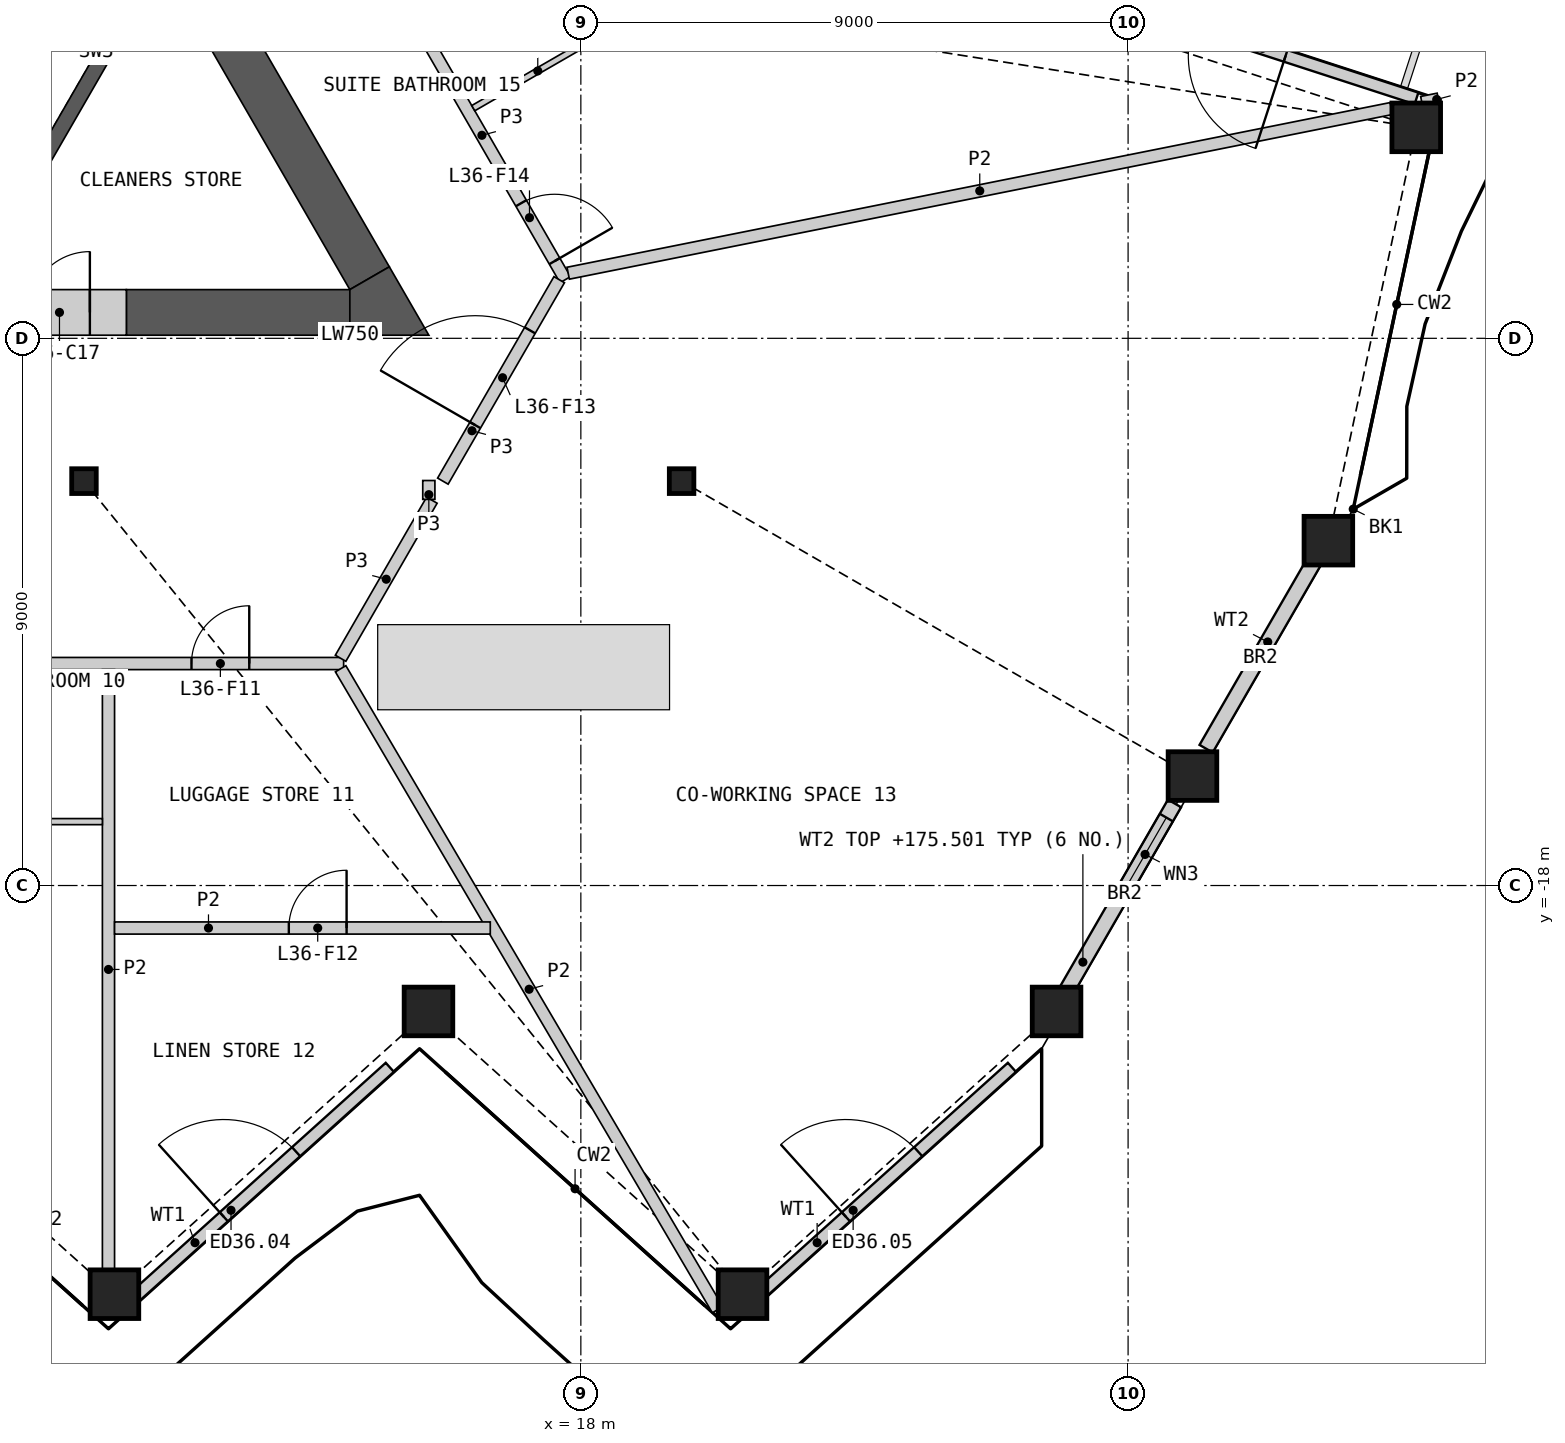
"""IFC4 building model, lengths in metres.
Left out: names, types, materials, properties, quantities, classifications, styles, units other than length and angle.
Written with IfcOpenShell. Run it as: python <this file> out.ifc"""

import sys

from ifc_helpers import new_model, si_unit, direction, frame, frame_2d, origin, origin_2d, place, context, subcontext, project, spatial, polyline, rectangle, hollow_rectangle, i_section, outline, extrude, element, fill, save


model = new_model("IFC4")
c1 = context("Model", 3, precision=1e-05, world=origin(), true_north=direction((0.0, 1.0)))
c2 = subcontext(c1, "Body", "Model", "MODEL_VIEW")
j1 = project(units=[si_unit("LENGTHUNIT", "METRE"), si_unit("PLANEANGLEUNIT", "RADIAN")], contexts=[c1])
p1 = place(None, origin())
s1 = spatial("IfcSite", under=j1, at=p1, CompositionType="ELEMENT")
p2 = place(p1, origin())
s2 = spatial("IfcBuilding", under=s1, at=p2, CompositionType="ELEMENT")
p3 = place(p2, frame((0.0, 0.0, 172.8)))
s3 = spatial("IfcBuildingStorey", under=s2, at=p3, CompositionType="ELEMENT", Elevation=172.8)
for number, where, z_axis, x_axis in (
    (1, (10.329, -24.722, 0.0), (0.0, 0.0, 1.0), (1.0, 0.0, 0.0)),
    (2, (15.494, -20.071, 0.0), (0.0, 0.0, 1.0), (1.0, 0.0, 0.0)),
    (3, (20.659, -24.722, 0.0), (0.0, 0.0, 1.0), (1.0, 0.0, 0.0)),
    (4, (25.823, -20.071, 0.0), (0.0, 0.0, 1.0), (1.0, 0.0, 0.0)),
    (5, (28.059, -16.2, 0.0), (0.0, 0.0, 1.0), (1.0, 0.0, 0.0)),
    (6, (30.294, -12.328, 0.0), (0.0, 0.0, 1.0), (1.0, 0.0, 0.0)),
    (7, (31.739, -5.53, 0.0), (0.0, 0.0, 1.0), (1.0, 0.0, 0.0)),
):
    element("IfcColumn", number, at=place(p3, frame(where, z_axis=z_axis, x_axis=x_axis)), inside=s3, PredefinedType="COLUMN", context=c2, shape_type="SweptSolid", body=[
        extrude(hollow_rectangle(XDim=0.8, YDim=0.8, WallThickness=0.05, at=origin_2d()), origin(), (0.0, 0.0, 1.0), 3.6),
    ])
for number, where, z_axis, x_axis in (
    (8, (9.828, -11.349, 0.0), (0.0, 0.0, 1.0), (1.0, 0.0, 0.0)),
    (9, (19.657, -11.349, 0.0), (0.0, 0.0, 1.0), (1.0, 0.0, 0.0)),
):
    element("IfcColumn", number, at=place(p3, frame(where, z_axis=z_axis, x_axis=x_axis)), inside=s3, PredefinedType="COLUMN", context=c2, shape_type="SweptSolid", body=[
        extrude(i_section(OverallWidth=0.404, OverallDepth=0.407, WebThickness=0.027, FlangeThickness=0.044, at=origin_2d()), origin(), (0.0, 0.0, 1.0), 3.6),
    ])
p4 = place(p3, frame((10.587, -24.836, 0.0), z_axis=(0.0, 0.0, 1.0), x_axis=(0.74315473474, 0.669119600844, 0.0)))
e10 = element("IfcWall", 10, at=p4, inside=s3, PredefinedType="SOLIDWALL", context=c2, shape_type="SweptSolid", body=[
    extrude(rectangle(XDim=5.748, YDim=0.2, at=frame_2d((2.874, 0.0))), origin(), (0.0, 0.0, 1.0), 2.701),
])
p5 = place(p4, frame((2.074, 0.0, 0.0)))
e11 = element("IfcOpeningElement", 11, at=p5, cuts=e10, PredefinedType="OPENING", context=c2, shape_type="SweptSolid", body=[
    extrude(rectangle(XDim=1.6, YDim=2.4, at=frame_2d((0.8, 1.2))), frame((0.0, 0.11, 0.0), z_axis=(0.0, -1.0, 0.0), x_axis=(1.0, 0.0, 0.0)), (0.0, 0.0, 1.0), 0.22),
])
p6 = place(p3, frame((20.818, -24.836, 0.0), z_axis=(0.0, 0.0, 1.0), x_axis=(0.74315473474, 0.669119600844, 0.0)))
e12 = element("IfcWall", 12, at=p6, inside=s3, PredefinedType="SOLIDWALL", context=c2, shape_type="SweptSolid", body=[
    extrude(rectangle(XDim=5.748, YDim=0.2, at=frame_2d((2.874, 0.0))), origin(), (0.0, 0.0, 1.0), 2.701),
])
p7 = place(p6, frame((2.074, 0.0, 0.0)))
e13 = element("IfcOpeningElement", 13, at=p7, cuts=e12, PredefinedType="OPENING", context=c2, shape_type="SweptSolid", body=[
    extrude(rectangle(XDim=1.6, YDim=2.4, at=frame_2d((0.8, 1.2))), frame((0.0, 0.11, 0.0), z_axis=(0.0, -1.0, 0.0), x_axis=(1.0, 0.0, 0.0)), (0.0, 0.0, 1.0), 0.22),
])
p8 = place(p3, frame((25.754, -20.13, 0.0), z_axis=(0.0, 0.0, 1.0), x_axis=(0.500039726511, 0.866002466458, 0.0)))
e14 = element("IfcWall", 14, at=p8, inside=s3, PredefinedType="SOLIDWALL", context=c2, shape_type="SweptSolid", body=[
    extrude(rectangle(XDim=4.019, YDim=0.25, at=frame_2d((2.009, 0.0))), origin(), (0.0, 0.0, 1.0), 2.701),
])
p9 = place(p8, frame((2.35, 0.0, 1.7)))
e15 = element("IfcOpeningElement", 15, at=p9, cuts=e14, PredefinedType="OPENING", context=c2, shape_type="SweptSolid", body=[
    extrude(rectangle(XDim=1.4, YDim=0.8, at=frame_2d((0.7, 0.4))), frame((0.0, 0.135, 0.0), z_axis=(0.0, -1.0, 0.0), x_axis=(1.0, 0.0, 0.0)), (0.0, 0.0, 1.0), 0.27),
])
p10 = place(p3, frame((28.283, -15.75, 0.0), z_axis=(0.0, 0.0, 1.0), x_axis=(0.500005680777, 0.866022123962, 0.0)))
e16 = element("IfcWall", 16, at=p10, inside=s3, PredefinedType="SOLIDWALL", context=c2, shape_type="SweptSolid", body=[
    extrude(rectangle(XDim=4.054, YDim=0.25, at=frame_2d((2.027, 0.0))), origin(), (0.0, 0.0, 1.0), 2.701),
])
p11 = place(p3, frame((31.743, -5.054, 0.0), z_axis=(0.0, 0.0, 1.0), x_axis=(-0.951061260164, 0.309002393867, 0.0)))
e17 = element("IfcWall", 17, at=p11, inside=s3, PredefinedType="SOLIDWALL", context=c2, shape_type="SweptSolid", body=[
    extrude(rectangle(XDim=5.938, YDim=0.2, at=frame_2d((2.969, 0.0))), origin(), (0.0, 0.0, 1.0), 2.701),
])
p12 = place(p11, frame((2.264, 0.0, 0.0)))
e18 = element("IfcOpeningElement", 18, at=p12, cuts=e17, PredefinedType="OPENING", context=c2, shape_type="SweptSolid", body=[
    extrude(rectangle(XDim=1.6, YDim=2.4, at=frame_2d((0.8, 1.2))), frame((0.0, 0.11, 0.0), z_axis=(0.0, -1.0, 0.0), x_axis=(1.0, 0.0, 0.0)), (0.0, 0.0, 1.0), 0.22),
])
p13 = place(p3, origin())
e19 = element("IfcWall", 19, at=p13, inside=s3, PredefinedType="SHEAR", context=c2, shape_type="SweptSolid", body=[
    extrude(outline(polyline([(8.83, -6.881), (10.374, -4.206), (10.032, -4.298), (8.738, -6.539), (8.83, -6.881)])), origin(), (0.0, 0.0, 1.0), 3.25),
])
p14 = place(p3, origin())
e20 = element("IfcWall", 20, at=p14, inside=s3, PredefinedType="SHEAR", context=c2, shape_type="SweptSolid", body=[
    extrude(outline(polyline([(10.032, -4.298), (10.374, -4.206), (5.307, -1.281), (5.182, -1.498), (10.032, -4.298)])), origin(), (0.0, 0.0, 1.0), 3.25),
])
p15 = place(p3, frame((10.525, -8.574, 0.0), z_axis=(0.0, 0.0, 1.0), x_axis=(1.0, 0.0, 0.0)))
e21 = element("IfcWall", 21, at=p15, inside=s3, PredefinedType="SHEAR", context=c2, shape_type="SweptSolid", body=[
    extrude(rectangle(XDim=3.676, YDim=0.75, at=frame_2d((1.838, 0.0))), origin(), (0.0, 0.0, 1.0), 3.25),
])
p16 = place(p3, frame((14.526, -8.011, 0.0), z_axis=(0.0, 0.0, 1.0), x_axis=(-0.499994855372, 0.866028374016, 0.0)))
e22 = element("IfcWall", 22, at=p16, inside=s3, PredefinedType="SHEAR", context=c2, shape_type="SweptSolid", body=[
    extrude(rectangle(XDim=14.301, YDim=0.75, at=frame_2d((7.15, 0.0))), origin(), (0.0, 0.0, 1.0), 3.25),
])
p17 = place(p3, origin())
e23 = element("IfcWall", 23, at=p17, inside=s3, PredefinedType="SHEAR", context=c2, shape_type="SweptSolid", body=[
    extrude(outline(polyline([(14.201, -8.949), (14.201, -8.199), (14.851, -7.824), (15.5, -8.949), (14.201, -8.949)])), origin(), (0.0, 0.0, 1.0), 3.25),
])
p18 = place(p3, frame((8.325, -8.574, 0.0), z_axis=(0.0, 0.0, 1.0), x_axis=(1.0, 0.0, 0.0)))
e24 = element("IfcWall", 24, at=p18, inside=s3, PredefinedType="SHEAR", context=c2, shape_type="SweptSolid", body=[
    extrude(rectangle(XDim=2.2, YDim=0.75, at=frame_2d((1.1, 0.0))), origin(), (0.0, 0.0, 1.0), 3.25),
])
p19 = place(p18, frame((0.6, 0.0, 0.0)))
e25 = element("IfcOpeningElement", 25, at=p19, cuts=e24, PredefinedType="OPENING", context=c2, shape_type="SweptSolid", body=[
    extrude(rectangle(XDim=1.0, YDim=2.1, at=frame_2d((0.5, 1.05))), frame((0.0, 0.385, 0.0), z_axis=(0.0, -1.0, 0.0), x_axis=(1.0, 0.0, 0.0)), (0.0, 0.0, 1.0), 0.77),
])
p20 = place(p3, frame((-14.099, -14.349, 0.0), z_axis=(0.0, 0.0, 1.0), x_axis=(1.0, 0.0, 0.0)))
e26 = element("IfcWall", 26, at=p20, inside=s3, PredefinedType="PARTITIONING", context=c2, shape_type="SweptSolid", body=[
    extrude(rectangle(XDim=28.198, YDim=0.2, at=frame_2d((14.099, 0.0))), origin(), (0.0, 0.0, 1.0), 3.25),
])
p21 = place(p20, frame((1.552, 0.0, 0.0)))
e27 = element("IfcOpeningElement", 27, at=p21, cuts=e26, PredefinedType="OPENING", context=c2, shape_type="SweptSolid", body=[
    extrude(rectangle(XDim=0.95, YDim=2.1, at=frame_2d((0.475, 1.05))), frame((0.0, 0.11, 0.0), z_axis=(0.0, -1.0, 0.0), x_axis=(1.0, 0.0, 0.0)), (0.0, 0.0, 1.0), 0.22),
])
p22 = place(p20, frame((7.677, 0.0, 0.0)))
e28 = element("IfcOpeningElement", 28, at=p22, cuts=e26, PredefinedType="OPENING", context=c2, shape_type="SweptSolid", body=[
    extrude(rectangle(XDim=1.0, YDim=2.1, at=frame_2d((0.5, 1.05))), frame((0.0, 0.11, 0.0), z_axis=(0.0, -1.0, 0.0), x_axis=(1.0, 0.0, 0.0)), (0.0, 0.0, 1.0), 0.22),
])
p23 = place(p20, frame((9.283, 0.0, 0.0)))
e29 = element("IfcOpeningElement", 29, at=p23, cuts=e26, PredefinedType="OPENING", context=c2, shape_type="SweptSolid", body=[
    extrude(rectangle(XDim=1.0, YDim=2.1, at=frame_2d((0.5, 1.05))), frame((0.0, 0.11, 0.0), z_axis=(0.0, -1.0, 0.0), x_axis=(1.0, 0.0, 0.0)), (0.0, 0.0, 1.0), 0.22),
])
p24 = place(p20, frame((17.915, 0.0, 0.0)))
e30 = element("IfcOpeningElement", 30, at=p24, cuts=e26, PredefinedType="OPENING", context=c2, shape_type="SweptSolid", body=[
    extrude(rectangle(XDim=1.0, YDim=2.1, at=frame_2d((0.5, 1.05))), frame((0.0, 0.11, 0.0), z_axis=(0.0, -1.0, 0.0), x_axis=(1.0, 0.0, 0.0)), (0.0, 0.0, 1.0), 0.22),
])
p25 = place(p20, frame((19.521, 0.0, 0.0)))
e31 = element("IfcOpeningElement", 31, at=p25, cuts=e26, PredefinedType="OPENING", context=c2, shape_type="SweptSolid", body=[
    extrude(rectangle(XDim=1.0, YDim=2.1, at=frame_2d((0.5, 1.05))), frame((0.0, 0.11, 0.0), z_axis=(0.0, -1.0, 0.0), x_axis=(1.0, 0.0, 0.0)), (0.0, 0.0, 1.0), 0.22),
])
p26 = place(p20, frame((25.696, 0.0, 0.0)))
e32 = element("IfcOpeningElement", 32, at=p26, cuts=e26, PredefinedType="OPENING", context=c2, shape_type="SweptSolid", body=[
    extrude(rectangle(XDim=0.95, YDim=2.1, at=frame_2d((0.475, 1.05))), frame((0.0, 0.11, 0.0), z_axis=(0.0, -1.0, 0.0), x_axis=(1.0, 0.0, 0.0)), (0.0, 0.0, 1.0), 0.22),
])
p27 = place(p3, frame((15.002, -3.286, 0.0), z_axis=(0.0, 0.0, 1.0), x_axis=(0.500007607708, -0.866021011428, 0.0)))
e33 = element("IfcWall", 33, at=p27, inside=s3, PredefinedType="PARTITIONING", context=c2, shape_type="SweptSolid", body=[
    extrude(rectangle(XDim=5.484, YDim=0.2, at=frame_2d((2.742, 0.0))), origin(), (0.0, 0.0, 1.0), 3.25),
])
p28 = place(p27, frame((4.032, 0.0, 0.0)))
e34 = element("IfcOpeningElement", 34, at=p28, cuts=e33, PredefinedType="OPENING", context=c2, shape_type="SweptSolid", body=[
    extrude(rectangle(XDim=1.1, YDim=2.1, at=frame_2d((0.55, 1.05))), frame((0.0, 0.11, 0.0), z_axis=(0.0, -1.0, 0.0), x_axis=(1.0, 0.0, 0.0)), (0.0, 0.0, 1.0), 0.22),
])
p29 = place(p3, frame((15.731, -11.349, 0.0), z_axis=(0.0, 0.0, 1.0), x_axis=(0.499961815444, 0.866047448526, 0.0)))
e35 = element("IfcWall", 35, at=p29, inside=s3, PredefinedType="PARTITIONING", context=c2, shape_type="SweptSolid", body=[
    extrude(rectangle(XDim=3.826, YDim=0.2, at=frame_2d((1.913, 0.0))), origin(), (0.0, 0.0, 1.0), 3.25),
])
p30 = place(p29, frame((1.064, 0.0, 0.0)))
e36 = element("IfcOpeningElement", 36, at=p30, cuts=e35, PredefinedType="OPENING", context=c2, shape_type="SweptSolid", body=[
    extrude(rectangle(XDim=1.8, YDim=2.1, at=frame_2d((0.9, 1.05))), frame((0.0, 0.11, 0.0), z_axis=(0.0, -1.0, 0.0), x_axis=(1.0, 0.0, 0.0)), (0.0, 0.0, 1.0), 0.22),
])
p31 = place(p3, frame((14.049, -14.262, 0.0), z_axis=(0.0, 0.0, 1.0), x_axis=(0.500048608389, 0.865997337899, 0.0)))
e37 = element("IfcWall", 37, at=p31, inside=s3, PredefinedType="PARTITIONING", context=c2, shape_type="SweptSolid", body=[
    extrude(rectangle(XDim=3.002, YDim=0.2, at=frame_2d((1.501, 0.0))), origin(), (0.0, 0.0, 1.0), 3.25),
])
p32 = place(p3, frame((15.5, -11.649, 0.0), z_axis=(0.0, 0.0, 1.0), x_axis=(0.0, 1.0, 0.0)))
e38 = element("IfcWall", 38, at=p32, inside=s3, PredefinedType="PARTITIONING", context=c2, shape_type="SweptSolid", body=[
    extrude(rectangle(XDim=0.31, YDim=0.2, at=frame_2d((0.155, 0.0))), origin(), (0.0, 0.0, 1.0), 3.25),
])
p33 = place(p3, frame((17.792, -7.929, 0.0), z_axis=(0.0, 0.0, 1.0), x_axis=(0.980565709097, 0.196190953266, 0.0)))
e39 = element("IfcWall", 39, at=p33, inside=s3, PredefinedType="PARTITIONING", context=c2, shape_type="SweptSolid", body=[
    extrude(rectangle(XDim=13.805, YDim=0.2, at=frame_2d((6.903, 0.0))), origin(), (0.0, 0.0, 1.0), 2.404),
])
p34 = place(p3, frame((14.05, -14.435, 0.0), z_axis=(0.0, 0.0, 1.0), x_axis=(0.50691019554, -0.861998871031, 0.0)))
e40 = element("IfcWall", 40, at=p34, inside=s3, PredefinedType="PARTITIONING", context=c2, shape_type="SweptSolid", body=[
    extrude(rectangle(XDim=12.229, YDim=0.2, at=frame_2d((6.115, 0.0))), origin(), (0.0, 0.0, 1.0), 2.404),
])
p35 = place(p3, frame((10.231, -24.312, 0.0), z_axis=(0.0, 0.0, 1.0), x_axis=(0.0, 1.0, 0.0)))
e41 = element("IfcWall", 41, at=p35, inside=s3, PredefinedType="PARTITIONING", context=c2, shape_type="SweptSolid", body=[
    extrude(rectangle(XDim=9.863, YDim=0.2, at=frame_2d((4.931, 0.0))), origin(), (0.0, 0.0, 1.0), 2.404),
])
p36 = place(p3, frame((10.331, -18.699, 0.0), z_axis=(0.0, 0.0, 1.0), x_axis=(1.0, 0.0, 0.0)))
e42 = element("IfcWall", 42, at=p36, inside=s3, PredefinedType="PARTITIONING", context=c2, shape_type="SweptSolid", body=[
    extrude(rectangle(XDim=6.179, YDim=0.2, at=frame_2d((3.09, 0.0))), origin(), (0.0, 0.0, 1.0), 2.404),
])
p37 = place(p36, frame((2.866, 0.0, 0.0)))
e43 = element("IfcOpeningElement", 43, at=p37, cuts=e42, PredefinedType="OPENING", context=c2, shape_type="SweptSolid", body=[
    extrude(rectangle(XDim=0.95, YDim=2.1, at=frame_2d((0.475, 1.05))), frame((0.0, 0.11, 0.0), z_axis=(0.0, -1.0, 0.0), x_axis=(1.0, 0.0, 0.0)), (0.0, 0.0, 1.0), 0.22),
])
p38 = place(p3, frame((31.831, -5.12, 0.0), z_axis=(0.0, 0.0, 1.0), x_axis=(0.980512850695, 0.19645495571, 0.0)))
e44 = element("IfcWall", 44, at=p38, inside=s3, PredefinedType="PARTITIONING", context=c2, shape_type="SweptSolid", body=[
    extrude(rectangle(XDim=0.277, YDim=0.2, at=frame_2d((0.139, 0.0))), origin(), (0.0, 0.0, 1.0), 2.404),
])
p39 = place(p3, frame((7.481, -16.949, 0.0), z_axis=(0.0, 0.0, 1.0), x_axis=(1.0, 0.0, 0.0)))
e45 = element("IfcWall", 45, at=p39, inside=s3, PredefinedType="PARTITIONING", context=c2, shape_type="SweptSolid", body=[
    extrude(rectangle(XDim=2.65, YDim=0.1, at=frame_2d((1.325, 0.0))), origin(), (0.0, 0.0, 1.0), 2.404),
])
p40 = place(p39, frame((0.25, 0.0, 0.0)))
e46 = element("IfcOpeningElement", 46, at=p40, cuts=e45, PredefinedType="OPENING", context=c2, shape_type="SweptSolid", body=[
    extrude(rectangle(XDim=0.95, YDim=2.1, at=frame_2d((0.475, 1.05))), frame((0.0, 0.06, 0.0), z_axis=(0.0, -1.0, 0.0), x_axis=(1.0, 0.0, 0.0)), (0.0, 0.0, 1.0), 0.12),
])
p41 = place(p3, frame((16.231, -5.215, 0.0), z_axis=(0.0, 0.0, 1.0), x_axis=(0.866057815567, 0.499943856944, 0.0)))
e47 = element("IfcWall", 47, at=p41, inside=s3, PredefinedType="PARTITIONING", context=c2, shape_type="SweptSolid", body=[
    extrude(rectangle(XDim=2.45, YDim=0.1, at=frame_2d((1.225, 0.0))), origin(), (0.0, 0.0, 1.0), 2.404),
])
p42 = place(p5, origin())
e48 = element("IfcDoor", 48, at=p42, inside=s3, OperationType="DOUBLE_DOOR_SINGLE_SWING", PredefinedType="DOOR", context=c2, shape_type="SweptSolid", body=[
    extrude(rectangle(XDim=1.6, YDim=2.4, at=frame_2d((0.8, 1.2))), frame((0.0, 0.025, 0.0), z_axis=(0.0, -1.0, 0.0), x_axis=(1.0, 0.0, 0.0)), (0.0, 0.0, 1.0), 0.05),
])
fill(e11, e48)
p43 = place(p7, origin())
e49 = element("IfcDoor", 49, at=p43, inside=s3, OperationType="DOUBLE_DOOR_SINGLE_SWING", PredefinedType="DOOR", context=c2, shape_type="SweptSolid", body=[
    extrude(rectangle(XDim=1.6, YDim=2.4, at=frame_2d((0.8, 1.2))), frame((0.0, 0.025, 0.0), z_axis=(0.0, -1.0, 0.0), x_axis=(1.0, 0.0, 0.0)), (0.0, 0.0, 1.0), 0.05),
])
fill(e13, e49)
p44 = place(p9, origin())
e50 = element("IfcWindow", 50, at=p44, inside=s3, PartitioningType="SINGLE_PANEL", PredefinedType="WINDOW", context=c2, shape_type="SweptSolid", body=[
    extrude(rectangle(XDim=1.4, YDim=0.8, at=frame_2d((0.7, 0.4))), frame((0.0, 0.03, 0.0), z_axis=(0.0, -1.0, 0.0), x_axis=(1.0, 0.0, 0.0)), (0.0, 0.0, 1.0), 0.06),
])
fill(e15, e50)
p45 = place(p12, origin())
e51 = element("IfcDoor", 51, at=p45, inside=s3, OperationType="DOUBLE_DOOR_SINGLE_SWING", PredefinedType="DOOR", context=c2, shape_type="SweptSolid", body=[
    extrude(rectangle(XDim=1.6, YDim=2.4, at=frame_2d((0.8, 1.2))), frame((0.0, 0.025, 0.0), z_axis=(0.0, -1.0, 0.0), x_axis=(1.0, 0.0, 0.0)), (0.0, 0.0, 1.0), 0.05),
])
fill(e18, e51)
p46 = place(p19, origin())
e52 = element("IfcDoor", 52, at=p46, inside=s3, OperationType="SINGLE_SWING_RIGHT", PredefinedType="DOOR", context=c2, shape_type="SweptSolid", body=[
    extrude(rectangle(XDim=1.0, YDim=2.1, at=frame_2d((0.5, 1.05))), frame((0.0, 0.13, 0.0), z_axis=(0.0, -1.0, 0.0), x_axis=(1.0, 0.0, 0.0)), (0.0, 0.0, 1.0), 0.05),
])
fill(e25, e52)
p47 = place(p26, origin())
e53 = element("IfcDoor", 53, at=p47, inside=s3, OperationType="SINGLE_SWING_RIGHT", PredefinedType="DOOR", context=c2, shape_type="SweptSolid", body=[
    extrude(rectangle(XDim=0.95, YDim=2.1, at=frame_2d((0.475, 1.05))), frame((0.0, 0.025, 0.0), z_axis=(0.0, -1.0, 0.0), x_axis=(1.0, 0.0, 0.0)), (0.0, 0.0, 1.0), 0.05),
])
fill(e32, e53)
p48 = place(p37, origin())
e54 = element("IfcDoor", 54, at=p48, inside=s3, OperationType="SINGLE_SWING_RIGHT", PredefinedType="DOOR", context=c2, shape_type="SweptSolid", body=[
    extrude(rectangle(XDim=0.95, YDim=2.1, at=frame_2d((0.475, 1.05))), frame((0.0, 0.025, 0.0), z_axis=(0.0, -1.0, 0.0), x_axis=(1.0, 0.0, 0.0)), (0.0, 0.0, 1.0), 0.05),
])
fill(e43, e54)
p49 = place(p30, origin())
e55 = element("IfcDoor", 55, at=p49, inside=s3, OperationType="DOUBLE_DOOR_SINGLE_SWING", PredefinedType="DOOR", context=c2, shape_type="SweptSolid", body=[
    extrude(rectangle(XDim=1.8, YDim=2.1, at=frame_2d((0.9, 1.05))), frame((0.0, 0.025, 0.0), z_axis=(0.0, -1.0, 0.0), x_axis=(1.0, 0.0, 0.0)), (0.0, 0.0, 1.0), 0.05),
])
fill(e36, e55)
p50 = place(p28, origin())
e56 = element("IfcDoor", 56, at=p50, inside=s3, OperationType="SINGLE_SWING_RIGHT", PredefinedType="DOOR", context=c2, shape_type="SweptSolid", body=[
    extrude(rectangle(XDim=1.1, YDim=2.1, at=frame_2d((0.55, 1.05))), frame((0.0, 0.025, 0.0), z_axis=(0.0, -1.0, 0.0), x_axis=(1.0, 0.0, 0.0)), (0.0, 0.0, 1.0), 0.05),
])
fill(e34, e56)
save(model, sys.argv[1])
